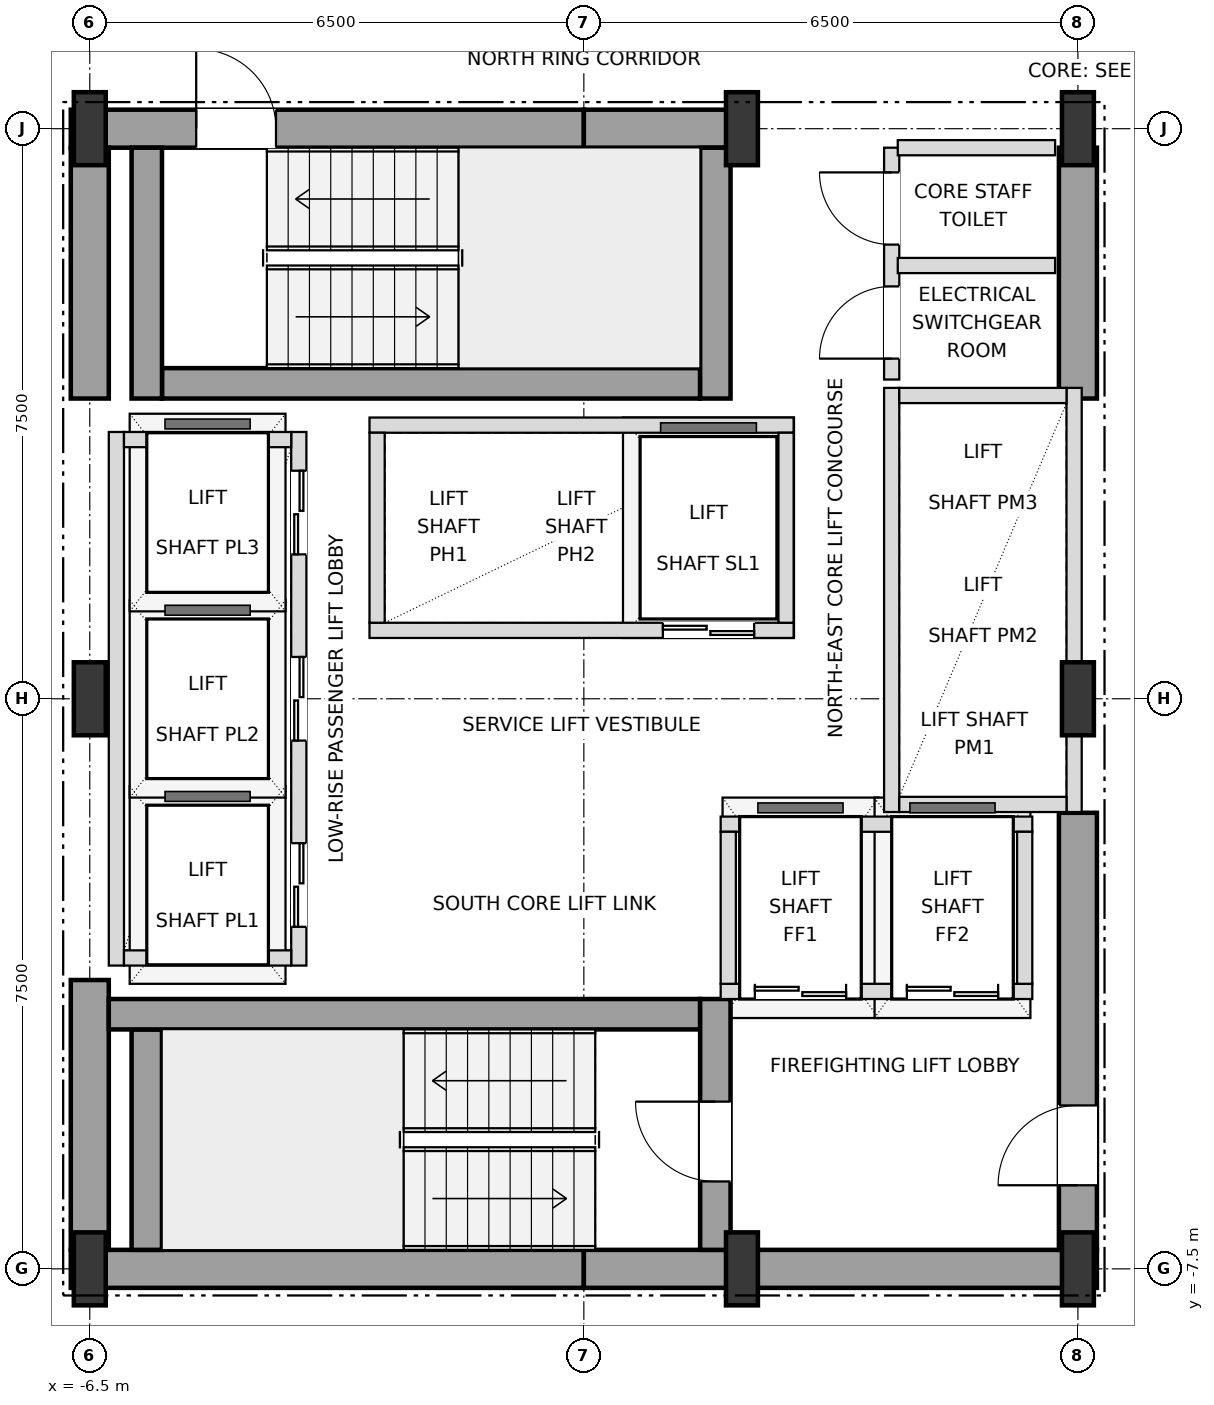
"""IFC4 building model, lengths in metres.
Left out: names, types, materials, properties, quantities, classifications, styles, units other than length and angle.
Written with IfcOpenShell. Run it as: python <this file> out.ifc"""

import sys

from ifc_helpers import new_model, si_unit, direction, frame, frame_2d, origin, origin_2d, place, context, subcontext, project, spatial, rectangle, i_section, extrude, element, fill, save


model = new_model("IFC4")
c1 = context("Model", 3, precision=1e-05, world=origin(), true_north=direction((0.0, 1.0)))
c2 = subcontext(c1, "Body", "Model", "MODEL_VIEW")
j1 = project(units=[si_unit("LENGTHUNIT", "METRE"), si_unit("PLANEANGLEUNIT", "RADIAN")], contexts=[c1])
p1 = place(None, origin())
s1 = spatial("IfcSite", under=j1, at=p1, CompositionType="ELEMENT")
p2 = place(p1, origin())
s2 = spatial("IfcBuilding", under=s1, at=p2, CompositionType="ELEMENT")
p3 = place(p2, frame((0.0, 0.0, 32.4)))
s3 = spatial("IfcBuildingStorey", under=s2, at=p3, CompositionType="ELEMENT", Elevation=32.4)
for number, where, z_axis, x_axis in (
    (1, (-6.5, -7.5, 0.0), (0.0, 0.0, 1.0), (1.0, 0.0, 0.0)),
    (2, (2.08, -7.5, 0.0), (0.0, 0.0, 1.0), (1.0, 0.0, 0.0)),
    (3, (6.5, -7.5, 0.0), (0.0, 0.0, 1.0), (1.0, 0.0, 0.0)),
    (4, (-6.5, 0.0, 0.0), (0.0, 0.0, 1.0), (1.0, 0.0, 0.0)),
    (5, (6.5, 0.0, 0.0), (0.0, 0.0, 1.0), (1.0, 0.0, 0.0)),
    (6, (-6.5, 7.5, 0.0), (0.0, 0.0, 1.0), (1.0, 0.0, 0.0)),
    (7, (2.08, 7.5, 0.0), (0.0, 0.0, 1.0), (1.0, 0.0, 0.0)),
    (8, (6.5, 7.5, 0.0), (0.0, 0.0, 1.0), (1.0, 0.0, 0.0)),
):
    element("IfcColumn", number, at=place(p3, frame(where, z_axis=z_axis, x_axis=x_axis)), inside=s3, PredefinedType="COLUMN", context=c2, shape_type="SweptSolid", body=[
        extrude(i_section(OverallWidth=0.42, OverallDepth=0.96, WebThickness=0.022, FlangeThickness=0.034, at=origin_2d()), origin(), (0.0, 0.0, 1.0), 3.6),
    ])
for number, where, z_axis, x_axis in (
    (9, (-6.75, -7.5, 0.0), (0.0, 0.0, 1.0), (1.0, 0.0, 0.0)),
    (10, (0.0, -7.5, 0.0), (0.0, 0.0, 1.0), (1.0, 0.0, 0.0)),
):
    element("IfcWall", number, at=place(p3, frame(where, z_axis=z_axis, x_axis=x_axis)), inside=s3, PredefinedType="SHEAR", context=c2, shape_type="SweptSolid", body=[
        extrude(rectangle(XDim=6.75, YDim=0.5, at=frame_2d((3.375, 0.0))), origin(), (0.0, 0.0, 1.0), 3.38),
    ])
p4 = place(p3, frame((-6.75, 7.5, 0.0), z_axis=(0.0, 0.0, 1.0), x_axis=(1.0, 0.0, 0.0)))
e11 = element("IfcWall", 11, at=p4, inside=s3, PredefinedType="SHEAR", context=c2, shape_type="SweptSolid", body=[
    extrude(rectangle(XDim=6.75, YDim=0.5, at=frame_2d((3.375, 0.0))), origin(), (0.0, 0.0, 1.0), 3.38),
])
p5 = place(p4, frame((1.65, 0.0, 0.0)))
e12 = element("IfcOpeningElement", 12, at=p5, cuts=e11, PredefinedType="OPENING", context=c2, shape_type="SweptSolid", body=[
    extrude(rectangle(XDim=1.05, YDim=2.15, at=frame_2d((0.525, 1.075))), frame((0.0, 0.26, 0.0), z_axis=(0.0, -1.0, 0.0), x_axis=(1.0, 0.0, 0.0)), (0.0, 0.0, 1.0), 0.52),
])
p6 = place(p3, frame((0.0, 7.5, 0.0), z_axis=(0.0, 0.0, 1.0), x_axis=(1.0, 0.0, 0.0)))
e13 = element("IfcWall", 13, at=p6, inside=s3, PredefinedType="SHEAR", context=c2, shape_type="SweptSolid", body=[
    extrude(rectangle(XDim=2.08, YDim=0.5, at=frame_2d((1.04, 0.0))), origin(), (0.0, 0.0, 1.0), 3.38),
])
p7 = place(p3, frame((-6.5, -7.25, 0.0), z_axis=(0.0, 0.0, 1.0), x_axis=(0.0, 1.0, 0.0)))
e14 = element("IfcWall", 14, at=p7, inside=s3, PredefinedType="SHEAR", context=c2, shape_type="SweptSolid", body=[
    extrude(rectangle(XDim=3.55, YDim=0.5, at=frame_2d((1.775, 0.0))), origin(), (0.0, 0.0, 1.0), 3.38),
])
p8 = place(p3, frame((-6.5, 3.95, 0.0), z_axis=(0.0, 0.0, 1.0), x_axis=(0.0, 1.0, 0.0)))
e15 = element("IfcWall", 15, at=p8, inside=s3, PredefinedType="SHEAR", context=c2, shape_type="SweptSolid", body=[
    extrude(rectangle(XDim=3.3, YDim=0.5, at=frame_2d((1.65, 0.0))), origin(), (0.0, 0.0, 1.0), 3.38),
])
p9 = place(p3, frame((6.5, -7.25, 0.0), z_axis=(0.0, 0.0, 1.0), x_axis=(0.0, 1.0, 0.0)))
e16 = element("IfcWall", 16, at=p9, inside=s3, PredefinedType="SHEAR", context=c2, shape_type="SweptSolid", body=[
    extrude(rectangle(XDim=5.75, YDim=0.5, at=frame_2d((2.875, 0.0))), origin(), (0.0, 0.0, 1.0), 3.38),
])
p10 = place(p9, frame((0.85, 0.0, 0.0)))
e17 = element("IfcOpeningElement", 17, at=p10, cuts=e16, PredefinedType="OPENING", context=c2, shape_type="SweptSolid", body=[
    extrude(rectangle(XDim=1.05, YDim=2.15, at=frame_2d((0.525, 1.075))), frame((0.0, 0.26, 0.0), z_axis=(0.0, -1.0, 0.0), x_axis=(1.0, 0.0, 0.0)), (0.0, 0.0, 1.0), 0.52),
])
p11 = place(p3, frame((6.5, 3.95, 0.0), z_axis=(0.0, 0.0, 1.0), x_axis=(0.0, 1.0, 0.0)))
e18 = element("IfcWall", 18, at=p11, inside=s3, PredefinedType="SHEAR", context=c2, shape_type="SweptSolid", body=[
    extrude(rectangle(XDim=3.3, YDim=0.5, at=frame_2d((1.65, 0.0))), origin(), (0.0, 0.0, 1.0), 3.38),
])
p12 = place(p3, frame((-5.75, -7.25, 0.0), z_axis=(0.0, 0.0, 1.0), x_axis=(0.0, 1.0, 0.0)))
e19 = element("IfcWall", 19, at=p12, inside=s3, PredefinedType="SHEAR", context=c2, shape_type="SweptSolid", body=[
    extrude(rectangle(XDim=2.9, YDim=0.4, at=frame_2d((1.45, 0.0))), origin(), (0.0, 0.0, 1.0), 3.38),
])
p13 = place(p3, frame((-6.25, -4.15, 0.0), z_axis=(0.0, 0.0, 1.0), x_axis=(1.0, 0.0, 0.0)))
e20 = element("IfcWall", 20, at=p13, inside=s3, PredefinedType="SHEAR", context=c2, shape_type="SweptSolid", body=[
    extrude(rectangle(XDim=7.78, YDim=0.4, at=frame_2d((3.89, 0.0))), origin(), (0.0, 0.0, 1.0), 3.38),
])
p14 = place(p3, frame((1.73, -7.25, 0.0), z_axis=(0.0, 0.0, 1.0), x_axis=(0.0, 1.0, 0.0)))
e21 = element("IfcWall", 21, at=p14, inside=s3, PredefinedType="SHEAR", context=c2, shape_type="SweptSolid", body=[
    extrude(rectangle(XDim=3.3, YDim=0.4, at=frame_2d((1.65, 0.0))), origin(), (0.0, 0.0, 1.0), 3.38),
])
p15 = place(p14, frame((0.9, 0.0, 0.0)))
e22 = element("IfcOpeningElement", 22, at=p15, cuts=e21, PredefinedType="OPENING", context=c2, shape_type="SweptSolid", body=[
    extrude(rectangle(XDim=1.05, YDim=2.15, at=frame_2d((0.525, 1.075))), frame((0.0, 0.21, 0.0), z_axis=(0.0, -1.0, 0.0), x_axis=(1.0, 0.0, 0.0)), (0.0, 0.0, 1.0), 0.42),
])
p16 = place(p3, frame((-5.55, 4.15, 0.0), z_axis=(0.0, 0.0, 1.0), x_axis=(1.0, 0.0, 0.0)))
e23 = element("IfcWall", 23, at=p16, inside=s3, PredefinedType="SHEAR", context=c2, shape_type="SweptSolid", body=[
    extrude(rectangle(XDim=7.08, YDim=0.4, at=frame_2d((3.54, 0.0))), origin(), (0.0, 0.0, 1.0), 3.38),
])
for number, where, z_axis, x_axis in (
    (24, (1.73, 3.95, 0.0), (0.0, 0.0, 1.0), (0.0, 1.0, 0.0)),
    (25, (-5.75, 3.95, 0.0), (0.0, 0.0, 1.0), (0.0, 1.0, 0.0)),
):
    element("IfcWall", number, at=place(p3, frame(where, z_axis=z_axis, x_axis=x_axis)), inside=s3, PredefinedType="SHEAR", context=c2, shape_type="SweptSolid", body=[
        extrude(rectangle(XDim=3.3, YDim=0.4, at=frame_2d((1.65, 0.0))), origin(), (0.0, 0.0, 1.0), 3.38),
    ])
p17 = place(p3, frame((-3.75, -3.51, 0.0), z_axis=(0.0, 0.0, 1.0), x_axis=(0.0, 1.0, 0.0)))
e26 = element("IfcWall", 26, at=p17, inside=s3, PredefinedType="SOLIDWALL", context=c2, shape_type="SweptSolid", body=[
    extrude(rectangle(XDim=7.02, YDim=0.2, at=frame_2d((3.51, 0.0))), origin(), (0.0, 0.0, 1.0), 3.38),
])
p18 = place(p17, frame((0.51, 0.0, 0.0)))
e27 = element("IfcOpeningElement", 27, at=p18, cuts=e26, PredefinedType="OPENING", context=c2, shape_type="SweptSolid", body=[
    extrude(rectangle(XDim=1.1, YDim=2.15, at=frame_2d((0.55, 1.075))), frame((0.0, 0.11, 0.0), z_axis=(0.0, -1.0, 0.0), x_axis=(1.0, 0.0, 0.0)), (0.0, 0.0, 1.0), 0.22),
])
p19 = place(p17, frame((2.96, 0.0, 0.0)))
e28 = element("IfcOpeningElement", 28, at=p19, cuts=e26, PredefinedType="OPENING", context=c2, shape_type="SweptSolid", body=[
    extrude(rectangle(XDim=1.1, YDim=2.15, at=frame_2d((0.55, 1.075))), frame((0.0, 0.11, 0.0), z_axis=(0.0, -1.0, 0.0), x_axis=(1.0, 0.0, 0.0)), (0.0, 0.0, 1.0), 0.22),
])
p20 = place(p17, frame((5.41, 0.0, 0.0)))
e29 = element("IfcOpeningElement", 29, at=p20, cuts=e26, PredefinedType="OPENING", context=c2, shape_type="SweptSolid", body=[
    extrude(rectangle(XDim=1.1, YDim=2.15, at=frame_2d((0.55, 1.075))), frame((0.0, 0.11, 0.0), z_axis=(0.0, -1.0, 0.0), x_axis=(1.0, 0.0, 0.0)), (0.0, 0.0, 1.0), 0.22),
])
p21 = place(p3, frame((-6.15, -3.51, 0.0), z_axis=(0.0, 0.0, 1.0), x_axis=(0.0, 1.0, 0.0)))
e30 = element("IfcWall", 30, at=p21, inside=s3, PredefinedType="SOLIDWALL", context=c2, shape_type="SweptSolid", body=[
    extrude(rectangle(XDim=7.02, YDim=0.2, at=frame_2d((3.51, 0.0))), origin(), (0.0, 0.0, 1.0), 3.38),
])
for number, where, z_axis, x_axis in (
    (31, (-6.05, -3.41, 0.0), (0.0, 0.0, 1.0), (1.0, 0.0, 0.0)),
    (32, (-6.05, 3.41, 0.0), (0.0, 0.0, 1.0), (1.0, 0.0, 0.0)),
):
    element("IfcWall", number, at=place(p3, frame(where, z_axis=z_axis, x_axis=x_axis)), inside=s3, PredefinedType="SOLIDWALL", context=c2, shape_type="SweptSolid", body=[
        extrude(rectangle(XDim=2.2, YDim=0.2, at=frame_2d((1.1, 0.0))), origin(), (0.0, 0.0, 1.0), 3.38),
    ])
p22 = place(p3, frame((4.05, -1.49, 0.0), z_axis=(0.0, 0.0, 1.0), x_axis=(0.0, 1.0, 0.0)))
e33 = element("IfcWall", 33, at=p22, inside=s3, PredefinedType="SOLIDWALL", context=c2, shape_type="SweptSolid", body=[
    extrude(rectangle(XDim=5.58, YDim=0.2, at=frame_2d((2.79, 0.0))), origin(), (0.0, 0.0, 1.0), 3.38),
])
p23 = place(p3, frame((6.45, -1.49, 0.0), z_axis=(0.0, 0.0, 1.0), x_axis=(0.0, 1.0, 0.0)))
e34 = element("IfcWall", 34, at=p23, inside=s3, PredefinedType="SOLIDWALL", context=c2, shape_type="SweptSolid", body=[
    extrude(rectangle(XDim=5.58, YDim=0.2, at=frame_2d((2.79, 0.0))), origin(), (0.0, 0.0, 1.0), 2.816),
])
for number, where, z_axis, x_axis in (
    (35, (4.15, -1.39, 0.0), (0.0, 0.0, 1.0), (1.0, 0.0, 0.0)),
    (36, (4.15, 3.99, 0.0), (0.0, 0.0, 1.0), (1.0, 0.0, 0.0)),
):
    element("IfcWall", number, at=place(p3, frame(where, z_axis=z_axis, x_axis=x_axis)), inside=s3, PredefinedType="SOLIDWALL", context=c2, shape_type="SweptSolid", body=[
        extrude(rectangle(XDim=2.2, YDim=0.2, at=frame_2d((1.1, 0.0))), origin(), (0.0, 0.0, 1.0), 3.38),
    ])
p24 = place(p3, frame((-2.82, 0.9, 0.0), z_axis=(0.0, 0.0, 1.0), x_axis=(1.0, 0.0, 0.0)))
e37 = element("IfcWall", 37, at=p24, inside=s3, PredefinedType="SOLIDWALL", context=c2, shape_type="SweptSolid", body=[
    extrude(rectangle(XDim=5.58, YDim=0.2, at=frame_2d((2.79, 0.0))), origin(), (0.0, 0.0, 1.0), 3.38),
])
p25 = place(p24, frame((3.86, 0.0, 0.0)))
e38 = element("IfcOpeningElement", 38, at=p25, cuts=e37, PredefinedType="OPENING", context=c2, shape_type="SweptSolid", body=[
    extrude(rectangle(XDim=1.2, YDim=2.2, at=frame_2d((0.6, 1.1))), frame((0.0, 0.11, 0.0), z_axis=(0.0, -1.0, 0.0), x_axis=(1.0, 0.0, 0.0)), (0.0, 0.0, 1.0), 0.22),
])
p26 = place(p3, frame((-2.82, 3.6, 0.0), z_axis=(0.0, 0.0, 1.0), x_axis=(1.0, 0.0, 0.0)))
e39 = element("IfcWall", 39, at=p26, inside=s3, PredefinedType="SOLIDWALL", context=c2, shape_type="SweptSolid", body=[
    extrude(rectangle(XDim=5.58, YDim=0.2, at=frame_2d((2.79, 0.0))), origin(), (0.0, 0.0, 1.0), 3.38),
])
for number, where, z_axis, x_axis in (
    (40, (-2.72, 1.0, 0.0), (0.0, 0.0, 1.0), (0.0, 1.0, 0.0)),
    (41, (2.66, 1.0, 0.0), (0.0, 0.0, 1.0), (0.0, 1.0, 0.0)),
):
    element("IfcWall", number, at=place(p3, frame(where, z_axis=z_axis, x_axis=x_axis)), inside=s3, PredefinedType="SOLIDWALL", context=c2, shape_type="SweptSolid", body=[
        extrude(rectangle(XDim=2.5, YDim=0.2, at=frame_2d((1.25, 0.0))), origin(), (0.0, 0.0, 1.0), 3.38),
    ])
p27 = place(p3, frame((1.8, -3.85, 0.0), z_axis=(0.0, 0.0, 1.0), x_axis=(1.0, 0.0, 0.0)))
e42 = element("IfcWall", 42, at=p27, inside=s3, PredefinedType="SOLIDWALL", context=c2, shape_type="SweptSolid", body=[
    extrude(rectangle(XDim=4.1, YDim=0.2, at=frame_2d((2.05, 0.0))), origin(), (0.0, 0.0, 1.0), 3.38),
])
p28 = place(p27, frame((0.45, 0.0, 0.0)))
e43 = element("IfcOpeningElement", 43, at=p28, cuts=e42, PredefinedType="OPENING", context=c2, shape_type="SweptSolid", body=[
    extrude(rectangle(XDim=1.2, YDim=2.2, at=frame_2d((0.6, 1.1))), frame((0.0, 0.11, 0.0), z_axis=(0.0, -1.0, 0.0), x_axis=(1.0, 0.0, 0.0)), (0.0, 0.0, 1.0), 0.22),
])
p29 = place(p27, frame((2.45, 0.0, 0.0)))
e44 = element("IfcOpeningElement", 44, at=p29, cuts=e42, PredefinedType="OPENING", context=c2, shape_type="SweptSolid", body=[
    extrude(rectangle(XDim=1.2, YDim=2.2, at=frame_2d((0.6, 1.1))), frame((0.0, 0.11, 0.0), z_axis=(0.0, -1.0, 0.0), x_axis=(1.0, 0.0, 0.0)), (0.0, 0.0, 1.0), 0.22),
])
p30 = place(p3, frame((1.8, -1.65, 0.0), z_axis=(0.0, 0.0, 1.0), x_axis=(1.0, 0.0, 0.0)))
e45 = element("IfcWall", 45, at=p30, inside=s3, PredefinedType="SOLIDWALL", context=c2, shape_type="SweptSolid", body=[
    extrude(rectangle(XDim=4.1, YDim=0.2, at=frame_2d((2.05, 0.0))), origin(), (0.0, 0.0, 1.0), 3.38),
])
for number, where, z_axis, x_axis in (
    (46, (1.9, -3.75, 0.0), (0.0, 0.0, 1.0), (0.0, 1.0, 0.0)),
    (47, (5.8, -3.75, 0.0), (0.0, 0.0, 1.0), (0.0, 1.0, 0.0)),
):
    element("IfcWall", number, at=place(p3, frame(where, z_axis=z_axis, x_axis=x_axis)), inside=s3, PredefinedType="SOLIDWALL", context=c2, shape_type="SweptSolid", body=[
        extrude(rectangle(XDim=2.0, YDim=0.2, at=frame_2d((1.0, 0.0))), origin(), (0.0, 0.0, 1.0), 3.38),
    ])
p31 = place(p3, frame((4.05, 4.2, 0.0), z_axis=(0.0, 0.0, 1.0), x_axis=(0.0, 1.0, 0.0)))
e48 = element("IfcWall", 48, at=p31, inside=s3, PredefinedType="SOLIDWALL", context=c2, shape_type="SweptSolid", body=[
    extrude(rectangle(XDim=3.05, YDim=0.2, at=frame_2d((1.525, 0.0))), origin(), (0.0, 0.0, 1.0), 3.38),
])
p32 = place(p31, frame((0.275, 0.0, 0.0)))
e49 = element("IfcOpeningElement", 49, at=p32, cuts=e48, PredefinedType="OPENING", context=c2, shape_type="SweptSolid", body=[
    extrude(rectangle(XDim=0.95, YDim=2.15, at=frame_2d((0.475, 1.075))), frame((0.0, 0.11, 0.0), z_axis=(0.0, -1.0, 0.0), x_axis=(1.0, 0.0, 0.0)), (0.0, 0.0, 1.0), 0.22),
])
p33 = place(p31, frame((1.775, 0.0, 0.0)))
e50 = element("IfcOpeningElement", 50, at=p33, cuts=e48, PredefinedType="OPENING", context=c2, shape_type="SweptSolid", body=[
    extrude(rectangle(XDim=0.95, YDim=2.15, at=frame_2d((0.475, 1.075))), frame((0.0, 0.11, 0.0), z_axis=(0.0, -1.0, 0.0), x_axis=(1.0, 0.0, 0.0)), (0.0, 0.0, 1.0), 0.22),
])
for number, where, z_axis, x_axis in (
    (51, (4.13, 5.7, 0.0), (0.0, 0.0, 1.0), (1.0, 0.0, 0.0)),
    (52, (4.13, 7.25, 0.0), (0.0, 0.0, 1.0), (1.0, 0.0, 0.0)),
):
    element("IfcWall", number, at=place(p3, frame(where, z_axis=z_axis, x_axis=x_axis)), inside=s3, PredefinedType="SOLIDWALL", context=c2, shape_type="SweptSolid", body=[
        extrude(rectangle(XDim=2.07, YDim=0.2, at=frame_2d((1.035, 0.0))), origin(), (0.0, 0.0, 1.0), 3.38),
    ])
p34 = place(p10, origin())
e53 = element("IfcDoor", 53, at=p34, inside=s3, OperationType="SINGLE_SWING_LEFT", PredefinedType="DOOR", context=c2, shape_type="SweptSolid", body=[
    extrude(rectangle(XDim=1.05, YDim=2.15, at=frame_2d((0.525, 1.075))), frame((0.0, 0.025, 0.0), z_axis=(0.0, -1.0, 0.0), x_axis=(1.0, 0.0, 0.0)), (0.0, 0.0, 1.0), 0.05),
])
fill(e17, e53)
p35 = place(p15, origin())
e54 = element("IfcDoor", 54, at=p35, inside=s3, OperationType="SINGLE_SWING_RIGHT", PredefinedType="DOOR", context=c2, shape_type="SweptSolid", body=[
    extrude(rectangle(XDim=1.05, YDim=2.15, at=frame_2d((0.525, 1.075))), frame((0.0, 0.025, 0.0), z_axis=(0.0, -1.0, 0.0), x_axis=(1.0, 0.0, 0.0)), (0.0, 0.0, 1.0), 0.05),
])
fill(e22, e54)
p36 = place(p5, origin())
e55 = element("IfcDoor", 55, at=p36, inside=s3, OperationType="SINGLE_SWING_LEFT", PredefinedType="DOOR", context=c2, shape_type="SweptSolid", body=[
    extrude(rectangle(XDim=1.05, YDim=2.15, at=frame_2d((0.525, 1.075))), frame((0.0, 0.025, 0.0), z_axis=(0.0, -1.0, 0.0), x_axis=(1.0, 0.0, 0.0)), (0.0, 0.0, 1.0), 0.05),
])
fill(e12, e55)
p37 = place(p18, origin())
e56 = element("IfcDoor", 56, at=p37, inside=s3, OperationType="DOUBLE_DOOR_SLIDING", PredefinedType="DOOR", context=c2, shape_type="SweptSolid", body=[
    extrude(rectangle(XDim=1.1, YDim=2.15, at=frame_2d((0.55, 1.075))), frame((0.0, 0.025, 0.0), z_axis=(0.0, -1.0, 0.0), x_axis=(1.0, 0.0, 0.0)), (0.0, 0.0, 1.0), 0.05),
])
fill(e27, e56)
p38 = place(p19, origin())
e57 = element("IfcDoor", 57, at=p38, inside=s3, OperationType="DOUBLE_DOOR_SLIDING", PredefinedType="DOOR", context=c2, shape_type="SweptSolid", body=[
    extrude(rectangle(XDim=1.1, YDim=2.15, at=frame_2d((0.55, 1.075))), frame((0.0, 0.025, 0.0), z_axis=(0.0, -1.0, 0.0), x_axis=(1.0, 0.0, 0.0)), (0.0, 0.0, 1.0), 0.05),
])
fill(e28, e57)
p39 = place(p20, origin())
e58 = element("IfcDoor", 58, at=p39, inside=s3, OperationType="DOUBLE_DOOR_SLIDING", PredefinedType="DOOR", context=c2, shape_type="SweptSolid", body=[
    extrude(rectangle(XDim=1.1, YDim=2.15, at=frame_2d((0.55, 1.075))), frame((0.0, 0.025, 0.0), z_axis=(0.0, -1.0, 0.0), x_axis=(1.0, 0.0, 0.0)), (0.0, 0.0, 1.0), 0.05),
])
fill(e29, e58)
p40 = place(p25, origin())
e59 = element("IfcDoor", 59, at=p40, inside=s3, OperationType="DOUBLE_DOOR_SLIDING", PredefinedType="DOOR", context=c2, shape_type="SweptSolid", body=[
    extrude(rectangle(XDim=1.2, YDim=2.2, at=frame_2d((0.6, 1.1))), frame((0.0, 0.025, 0.0), z_axis=(0.0, -1.0, 0.0), x_axis=(1.0, 0.0, 0.0)), (0.0, 0.0, 1.0), 0.05),
])
fill(e38, e59)
p41 = place(p28, origin())
e60 = element("IfcDoor", 60, at=p41, inside=s3, OperationType="DOUBLE_DOOR_SLIDING", PredefinedType="DOOR", context=c2, shape_type="SweptSolid", body=[
    extrude(rectangle(XDim=1.2, YDim=2.2, at=frame_2d((0.6, 1.1))), frame((0.0, 0.025, 0.0), z_axis=(0.0, -1.0, 0.0), x_axis=(1.0, 0.0, 0.0)), (0.0, 0.0, 1.0), 0.05),
])
fill(e43, e60)
p42 = place(p29, origin())
e61 = element("IfcDoor", 61, at=p42, inside=s3, OperationType="DOUBLE_DOOR_SLIDING", PredefinedType="DOOR", context=c2, shape_type="SweptSolid", body=[
    extrude(rectangle(XDim=1.2, YDim=2.2, at=frame_2d((0.6, 1.1))), frame((0.0, 0.025, 0.0), z_axis=(0.0, -1.0, 0.0), x_axis=(1.0, 0.0, 0.0)), (0.0, 0.0, 1.0), 0.05),
])
fill(e44, e61)
p43 = place(p32, origin())
e62 = element("IfcDoor", 62, at=p43, inside=s3, OperationType="SINGLE_SWING_LEFT", PredefinedType="DOOR", context=c2, shape_type="SweptSolid", body=[
    extrude(rectangle(XDim=0.95, YDim=2.15, at=frame_2d((0.475, 1.075))), frame((0.0, 0.025, 0.0), z_axis=(0.0, -1.0, 0.0), x_axis=(1.0, 0.0, 0.0)), (0.0, 0.0, 1.0), 0.05),
])
fill(e49, e62)
p44 = place(p33, origin())
e63 = element("IfcDoor", 63, at=p44, inside=s3, OperationType="SINGLE_SWING_RIGHT", PredefinedType="DOOR", context=c2, shape_type="SweptSolid", body=[
    extrude(rectangle(XDim=0.95, YDim=2.15, at=frame_2d((0.475, 1.075))), frame((0.0, 0.025, 0.0), z_axis=(0.0, -1.0, 0.0), x_axis=(1.0, 0.0, 0.0)), (0.0, 0.0, 1.0), 0.05),
])
fill(e50, e63)
save(model, sys.argv[1])
